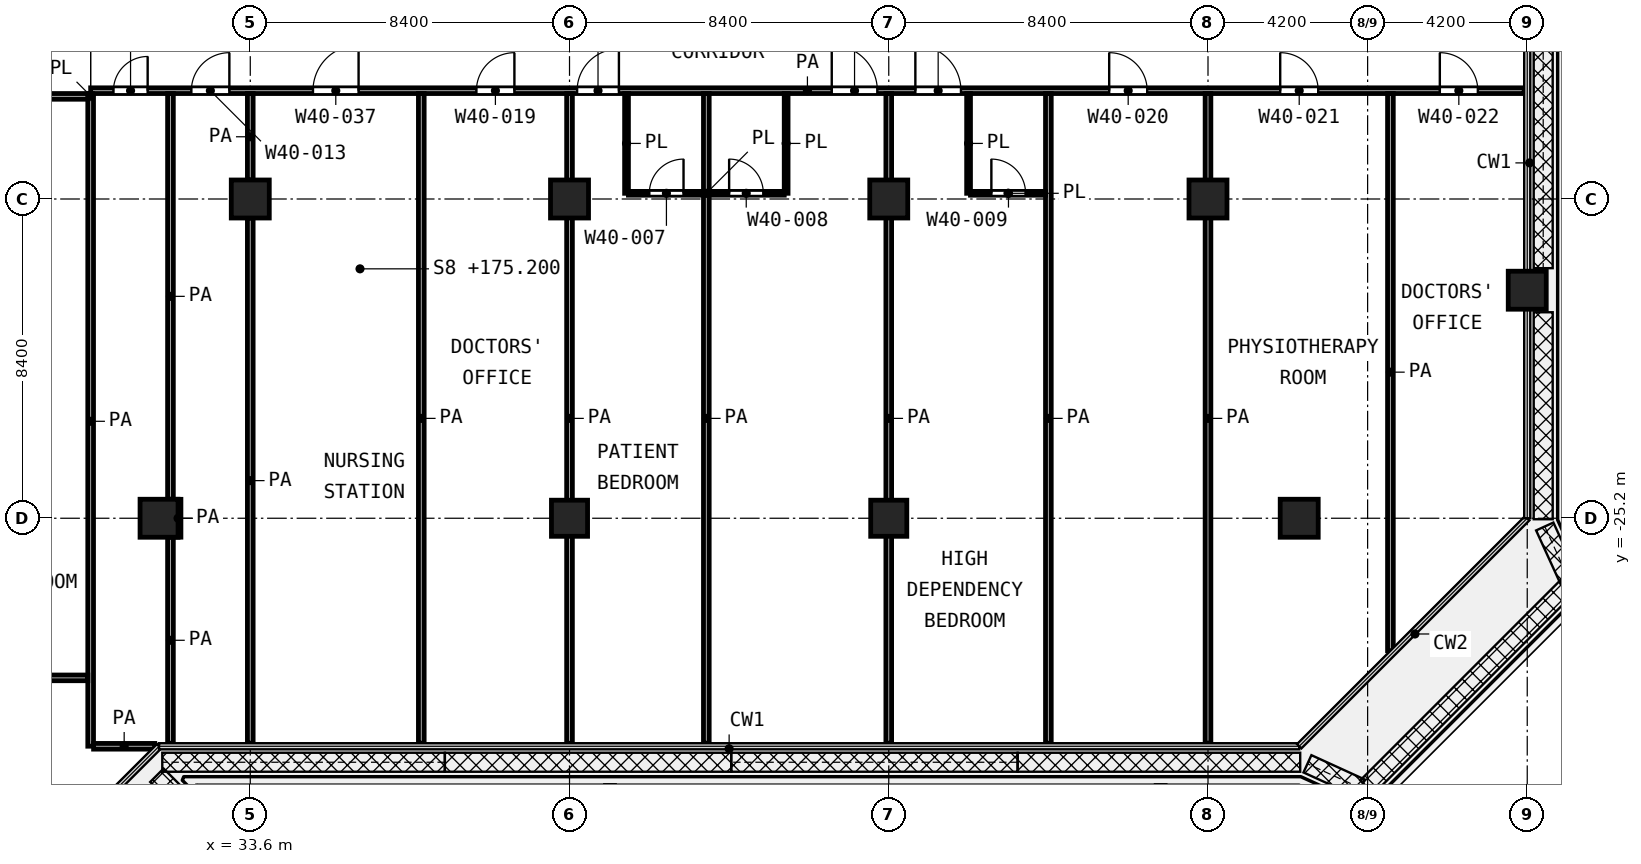
"""IFC4 building model, lengths in metres.
Left out: names, types, materials, properties, quantities, classifications, styles, units other than length and angle.
Written with IfcOpenShell. Run it as: python <this file> out.ifc"""

import sys

from ifc_helpers import new_model, si_unit, direction, frame, frame_2d, origin, origin_2d, place, context, subcontext, project, spatial, rectangle, extrude, element, fill, save


model = new_model("IFC4")
c1 = context("Model", 3, precision=1e-05, world=origin(), true_north=direction((0.0, 1.0)))
c2 = subcontext(c1, "Body", "Model", "MODEL_VIEW")
j1 = project(units=[si_unit("LENGTHUNIT", "METRE"), si_unit("PLANEANGLEUNIT", "RADIAN")], contexts=[c1])
p1 = place(None, origin())
s1 = spatial("IfcSite", under=j1, at=p1, CompositionType="ELEMENT")
p2 = place(p1, origin())
s2 = spatial("IfcBuilding", under=s1, at=p2, CompositionType="ELEMENT")
p3 = place(p2, frame((0.0, 0.0, 175.2)))
s3 = spatial("IfcBuildingStorey", under=s2, at=p3, CompositionType="ELEMENT", Elevation=175.2)
for number, where, z_axis, x_axis in (
    (1, (33.6, -16.8, 0.0), (0.0, 0.0, 1.0), (1.0, 0.0, 0.0)),
    (2, (42.0, -16.8, 0.0), (0.0, 0.0, 1.0), (1.0, 0.0, 0.0)),
    (3, (50.4, -16.8, 0.0), (0.0, 0.0, 1.0), (1.0, 0.0, 0.0)),
    (4, (58.8, -16.8, 0.0), (0.0, 0.0, 1.0), (1.0, 0.0, 0.0)),
    (5, (67.2, -19.2, 0.0), (0.0, 0.0, 1.0), (1.0, 0.0, 0.0)),
    (6, (31.2, -25.2, 0.0), (0.0, 0.0, 1.0), (1.0, 0.0, 0.0)),
):
    element("IfcColumn", number, at=place(p3, frame(where, z_axis=z_axis, x_axis=x_axis)), inside=s3, PredefinedType="COLUMN", context=c2, shape_type="SweptSolid", body=[
        extrude(rectangle(XDim=1.0, YDim=1.0, at=origin_2d()), origin(), (0.0, 0.0, 1.0), 4.2),
    ])
for number, where, z_axis, x_axis in (
    (7, (42.0, -25.2, 0.0), (0.0, 0.0, 1.0), (1.0, 0.0, 0.0)),
    (8, (50.4, -25.2, 0.0), (0.0, 0.0, 1.0), (1.0, 0.0, 0.0)),
):
    element("IfcColumn", number, at=place(p3, frame(where, z_axis=z_axis, x_axis=x_axis)), inside=s3, PredefinedType="COLUMN", context=c2, shape_type="SweptSolid", body=[
        extrude(rectangle(XDim=0.95, YDim=0.95, at=origin_2d()), origin(), (0.0, 0.0, 1.0), 4.2),
    ])
p4 = place(p3, frame((61.2, -25.2, 0.0), z_axis=(0.0, 0.0, 1.0), x_axis=(1.0, 0.0, 0.0)))
e9 = element("IfcColumn", 9, at=p4, inside=s3, PredefinedType="COLUMN", context=c2, shape_type="SweptSolid", body=[
    extrude(rectangle(XDim=1.0, YDim=1.0, at=origin_2d()), origin(), (0.0, 0.0, 1.0), 4.2),
])
p5 = place(p3, frame((43.55, -16.65, 0.0), z_axis=(0.0, 0.0, 1.0), x_axis=(1.0, 0.0, 0.0)))
e10 = element("IfcWall", 10, at=p5, inside=s3, PredefinedType="PARTITIONING", context=c2, shape_type="SweptSolid", body=[
    extrude(rectangle(XDim=4.1, YDim=0.1, at=frame_2d((2.05, 0.0))), origin(), (0.0, 0.0, 1.0), 3.6),
])
p6 = place(p5, frame((0.55, 0.0, 0.0)))
e11 = element("IfcOpeningElement", 11, at=p6, cuts=e10, PredefinedType="OPENING", context=c2, shape_type="SweptSolid", body=[
    extrude(rectangle(XDim=0.9, YDim=2.1, at=frame_2d((0.45, 1.05))), frame((0.0, 0.06, 0.0), z_axis=(0.0, -1.0, 0.0), x_axis=(1.0, 0.0, 0.0)), (0.0, 0.0, 1.0), 0.12),
])
p7 = place(p5, frame((2.65, 0.0, 0.0)))
e12 = element("IfcOpeningElement", 12, at=p7, cuts=e10, PredefinedType="OPENING", context=c2, shape_type="SweptSolid", body=[
    extrude(rectangle(XDim=0.9, YDim=2.1, at=frame_2d((0.45, 1.05))), frame((0.0, 0.06, 0.0), z_axis=(0.0, -1.0, 0.0), x_axis=(1.0, 0.0, 0.0)), (0.0, 0.0, 1.0), 0.12),
])
p8 = place(p3, frame((52.55, -16.65, 0.0), z_axis=(0.0, 0.0, 1.0), x_axis=(1.0, 0.0, 0.0)))
e13 = element("IfcWall", 13, at=p8, inside=s3, PredefinedType="PARTITIONING", context=c2, shape_type="SweptSolid", body=[
    extrude(rectangle(XDim=1.975, YDim=0.1, at=frame_2d((0.987, 0.0))), origin(), (0.0, 0.0, 1.0), 3.6),
])
p9 = place(p8, frame((0.55, 0.0, 0.0)))
e14 = element("IfcOpeningElement", 14, at=p9, cuts=e13, PredefinedType="OPENING", context=c2, shape_type="SweptSolid", body=[
    extrude(rectangle(XDim=0.9, YDim=2.1, at=frame_2d((0.45, 1.05))), frame((0.0, 0.06, 0.0), z_axis=(0.0, -1.0, 0.0), x_axis=(1.0, 0.0, 0.0)), (0.0, 0.0, 1.0), 0.12),
])
p10 = place(p3, frame((29.4, -14.147, 0.0), z_axis=(0.0, 0.0, 1.0), x_axis=(0.0, 1.0, 0.0)))
e15 = element("IfcWall", 15, at=p10, inside=s3, PredefinedType="PARTITIONING", context=c2, shape_type="SweptSolid", body=[
    extrude(rectangle(XDim=0.12, YDim=0.1, at=frame_2d((0.06, 0.0))), origin(), (0.0, 0.0, 1.0), 3.6),
])
for number, where, z_axis, x_axis in (
    (16, (43.5, -16.65, 0.0), (0.0, 0.0, 1.0), (0.0, 1.0, 0.0)),
    (17, (47.7, -16.65, 0.0), (0.0, 0.0, 1.0), (0.0, 1.0, 0.0)),
    (18, (52.5, -16.65, 0.0), (0.0, 0.0, 1.0), (0.0, 1.0, 0.0)),
):
    element("IfcWall", number, at=place(p3, frame(where, z_axis=z_axis, x_axis=x_axis)), inside=s3, PredefinedType="PARTITIONING", context=c2, shape_type="SweptSolid", body=[
        extrude(rectangle(XDim=2.625, YDim=0.1, at=frame_2d((1.312, 0.0))), origin(), (0.0, 0.0, 1.0), 3.6),
    ])
p11 = place(p3, frame((29.477, -31.2, 0.0), z_axis=(0.0, 0.0, 1.0), x_axis=(1.0, 0.0, 0.0)))
e19 = element("IfcWall", 19, at=p11, inside=s3, PredefinedType="PARTITIONING", context=c2, shape_type="SweptSolid", body=[
    extrude(rectangle(XDim=1.61, YDim=0.15, at=frame_2d((0.805, 0.0))), origin(), (0.0, 0.0, 1.0), 3.6),
])
p12 = place(p3, frame((14.175, -29.4, 0.0), z_axis=(0.0, 0.0, 1.0), x_axis=(1.0, 0.0, 0.0)))
e20 = element("IfcWall", 20, at=p12, inside=s3, PredefinedType="PARTITIONING", context=c2, shape_type="SweptSolid", body=[
    extrude(rectangle(XDim=15.15, YDim=0.15, at=frame_2d((7.575, 0.0))), origin(), (0.0, 0.0, 1.0), 3.6),
])
p13 = place(p3, frame((24.9, -14.1, 0.0), z_axis=(0.0, 0.0, 1.0), x_axis=(1.0, 0.0, 0.0)))
e21 = element("IfcWall", 21, at=p13, inside=s3, PredefinedType="PARTITIONING", context=c2, shape_type="SweptSolid", body=[
    extrude(rectangle(XDim=4.425, YDim=0.15, at=frame_2d((2.212, 0.0))), origin(), (0.0, 0.0, 1.0), 3.6),
])
p14 = place(p13, frame((1.65, 0.0, 0.0)))
e22 = element("IfcOpeningElement", 22, at=p14, cuts=e21, PredefinedType="OPENING", context=c2, shape_type="SweptSolid", body=[
    extrude(rectangle(XDim=1.5, YDim=2.1, at=frame_2d((0.75, 1.05))), frame((0.0, 0.085, 0.0), z_axis=(0.0, -1.0, 0.0), x_axis=(1.0, 0.0, 0.0)), (0.0, 0.0, 1.0), 0.17),
])
p15 = place(p3, frame((29.4, -13.95, 0.0), z_axis=(0.0, 0.0, 1.0), x_axis=(1.0, 0.0, 0.0)))
e23 = element("IfcWall", 23, at=p15, inside=s3, PredefinedType="PARTITIONING", context=c2, shape_type="SweptSolid", body=[
    extrude(rectangle(XDim=37.72, YDim=0.15, at=frame_2d((18.86, 0.0))), origin(), (0.0, 0.0, 1.0), 3.6),
])
p16 = place(p15, frame((10.15, 0.0, 0.0)))
e24 = element("IfcOpeningElement", 24, at=p16, cuts=e23, PredefinedType="OPENING", context=c2, shape_type="SweptSolid", body=[
    extrude(rectangle(XDim=1.0, YDim=2.1, at=frame_2d((0.5, 1.05))), frame((0.0, 0.085, 0.0), z_axis=(0.0, -1.0, 0.0), x_axis=(1.0, 0.0, 0.0)), (0.0, 0.0, 1.0), 0.17),
])
p17 = place(p15, frame((12.8, 0.0, 0.0)))
e25 = element("IfcOpeningElement", 25, at=p17, cuts=e23, PredefinedType="OPENING", context=c2, shape_type="SweptSolid", body=[
    extrude(rectangle(XDim=1.1, YDim=2.1, at=frame_2d((0.55, 1.05))), frame((0.0, 0.085, 0.0), z_axis=(0.0, -1.0, 0.0), x_axis=(1.0, 0.0, 0.0)), (0.0, 0.0, 1.0), 0.17),
])
p18 = place(p15, frame((19.5, 0.0, 0.0)))
e26 = element("IfcOpeningElement", 26, at=p18, cuts=e23, PredefinedType="OPENING", context=c2, shape_type="SweptSolid", body=[
    extrude(rectangle(XDim=1.2, YDim=2.1, at=frame_2d((0.6, 1.05))), frame((0.0, 0.085, 0.0), z_axis=(0.0, -1.0, 0.0), x_axis=(1.0, 0.0, 0.0)), (0.0, 0.0, 1.0), 0.17),
])
p19 = place(p15, frame((21.7, 0.0, 0.0)))
e27 = element("IfcOpeningElement", 27, at=p19, cuts=e23, PredefinedType="OPENING", context=c2, shape_type="SweptSolid", body=[
    extrude(rectangle(XDim=1.2, YDim=2.1, at=frame_2d((0.6, 1.05))), frame((0.0, 0.085, 0.0), z_axis=(0.0, -1.0, 0.0), x_axis=(1.0, 0.0, 0.0)), (0.0, 0.0, 1.0), 0.17),
])
p20 = place(p15, frame((26.8, 0.0, 0.0)))
e28 = element("IfcOpeningElement", 28, at=p20, cuts=e23, PredefinedType="OPENING", context=c2, shape_type="SweptSolid", body=[
    extrude(rectangle(XDim=1.0, YDim=2.1, at=frame_2d((0.5, 1.05))), frame((0.0, 0.085, 0.0), z_axis=(0.0, -1.0, 0.0), x_axis=(1.0, 0.0, 0.0)), (0.0, 0.0, 1.0), 0.17),
])
p21 = place(p15, frame((31.3, 0.0, 0.0)))
e29 = element("IfcOpeningElement", 29, at=p21, cuts=e23, PredefinedType="OPENING", context=c2, shape_type="SweptSolid", body=[
    extrude(rectangle(XDim=1.0, YDim=2.1, at=frame_2d((0.5, 1.05))), frame((0.0, 0.085, 0.0), z_axis=(0.0, -1.0, 0.0), x_axis=(1.0, 0.0, 0.0)), (0.0, 0.0, 1.0), 0.17),
])
p22 = place(p15, frame((35.5, 0.0, 0.0)))
e30 = element("IfcOpeningElement", 30, at=p22, cuts=e23, PredefinedType="OPENING", context=c2, shape_type="SweptSolid", body=[
    extrude(rectangle(XDim=1.0, YDim=2.1, at=frame_2d((0.5, 1.05))), frame((0.0, 0.085, 0.0), z_axis=(0.0, -1.0, 0.0), x_axis=(1.0, 0.0, 0.0)), (0.0, 0.0, 1.0), 0.17),
])
p23 = place(p15, frame((0.6, 0.0, 0.0)))
e31 = element("IfcOpeningElement", 31, at=p23, cuts=e23, PredefinedType="OPENING", context=c2, shape_type="SweptSolid", body=[
    extrude(rectangle(XDim=0.9, YDim=2.1, at=frame_2d((0.45, 1.05))), frame((0.0, 0.085, 0.0), z_axis=(0.0, -1.0, 0.0), x_axis=(1.0, 0.0, 0.0)), (0.0, 0.0, 1.0), 0.17),
])
p24 = place(p15, frame((2.65, 0.0, 0.0)))
e32 = element("IfcOpeningElement", 32, at=p24, cuts=e23, PredefinedType="OPENING", context=c2, shape_type="SweptSolid", body=[
    extrude(rectangle(XDim=1.0, YDim=2.1, at=frame_2d((0.5, 1.05))), frame((0.0, 0.085, 0.0), z_axis=(0.0, -1.0, 0.0), x_axis=(1.0, 0.0, 0.0)), (0.0, 0.0, 1.0), 0.17),
])
p25 = place(p15, frame((5.85, 0.0, 0.0)))
e33 = element("IfcOpeningElement", 33, at=p25, cuts=e23, PredefinedType="OPENING", context=c2, shape_type="SweptSolid", body=[
    extrude(rectangle(XDim=1.2, YDim=2.1, at=frame_2d((0.6, 1.05))), frame((0.0, 0.085, 0.0), z_axis=(0.0, -1.0, 0.0), x_axis=(1.0, 0.0, 0.0)), (0.0, 0.0, 1.0), 0.17),
])
p26 = place(p3, frame((29.4, -31.198, 0.0), z_axis=(0.0, 0.0, 1.0), x_axis=(0.0, 1.0, 0.0)))
e34 = element("IfcWall", 34, at=p26, inside=s3, PredefinedType="PARTITIONING", context=c2, shape_type="SweptSolid", body=[
    extrude(rectangle(XDim=17.098, YDim=0.15, at=frame_2d((8.549, 0.0))), origin(), (0.0, 0.0, 1.0), 3.6),
])
p27 = place(p3, frame((31.5, -31.12, 0.0), z_axis=(0.0, 0.0, 1.0), x_axis=(0.0, 1.0, 0.0)))
e35 = element("IfcWall", 35, at=p27, inside=s3, PredefinedType="PARTITIONING", context=c2, shape_type="SweptSolid", body=[
    extrude(rectangle(XDim=5.418, YDim=0.15, at=frame_2d((2.709, 0.0))), origin(), (0.0, 0.0, 1.0), 3.6),
])
p28 = place(p3, frame((31.5, -24.698, 0.0), z_axis=(0.0, 0.0, 1.0), x_axis=(0.0, 1.0, 0.0)))
e36 = element("IfcWall", 36, at=p28, inside=s3, PredefinedType="PARTITIONING", context=c2, shape_type="SweptSolid", body=[
    extrude(rectangle(XDim=10.673, YDim=0.15, at=frame_2d((5.336, 0.0))), origin(), (0.0, 0.0, 1.0), 3.6),
])
p29 = place(p3, frame((31.7, -25.698, 0.0), z_axis=(0.0, 0.0, 1.0), x_axis=(0.0, 1.0, 0.0)))
e37 = element("IfcWall", 37, at=p29, inside=s3, PredefinedType="PARTITIONING", context=c2, shape_type="SweptSolid", body=[
    extrude(rectangle(XDim=0.996, YDim=0.15, at=frame_2d((0.498, 0.0))), origin(), (0.0, 0.0, 1.0), 3.6),
])
p30 = place(p3, frame((33.6, -31.12, 0.0), z_axis=(0.0, 0.0, 1.0), x_axis=(0.0, 1.0, 0.0)))
e38 = element("IfcWall", 38, at=p30, inside=s3, PredefinedType="PARTITIONING", context=c2, shape_type="SweptSolid", body=[
    extrude(rectangle(XDim=13.82, YDim=0.15, at=frame_2d((6.91, 0.0))), origin(), (0.0, 0.0, 1.0), 3.6),
])
p31 = place(p3, frame((33.6, -16.3, 0.0), z_axis=(0.0, 0.0, 1.0), x_axis=(0.0, 1.0, 0.0)))
e39 = element("IfcWall", 39, at=p31, inside=s3, PredefinedType="PARTITIONING", context=c2, shape_type="SweptSolid", body=[
    extrude(rectangle(XDim=2.275, YDim=0.15, at=frame_2d((1.138, 0.0))), origin(), (0.0, 0.0, 1.0), 3.6),
])
for number, where, z_axis, x_axis in (
    (40, (38.1, -31.12, 0.0), (0.0, 0.0, 1.0), (0.0, 1.0, 0.0)),
    (41, (42.0, -31.12, 0.0), (0.0, 0.0, 1.0), (0.0, 1.0, 0.0)),
    (42, (45.6, -31.12, 0.0), (0.0, 0.0, 1.0), (0.0, 1.0, 0.0)),
    (43, (50.4, -31.12, 0.0), (0.0, 0.0, 1.0), (0.0, 1.0, 0.0)),
    (44, (54.6, -31.12, 0.0), (0.0, 0.0, 1.0), (0.0, 1.0, 0.0)),
    (45, (58.8, -31.12, 0.0), (0.0, 0.0, 1.0), (0.0, 1.0, 0.0)),
):
    element("IfcWall", number, at=place(p3, frame(where, z_axis=z_axis, x_axis=x_axis)), inside=s3, PredefinedType="PARTITIONING", context=c2, shape_type="SweptSolid", body=[
        extrude(rectangle(XDim=17.095, YDim=0.15, at=frame_2d((8.548, 0.0))), origin(), (0.0, 0.0, 1.0), 3.6),
    ])
p32 = place(p3, frame((63.6, -28.687, 0.0), z_axis=(0.0, 0.0, 1.0), x_axis=(0.0, 1.0, 0.0)))
e46 = element("IfcWall", 46, at=p32, inside=s3, PredefinedType="PARTITIONING", context=c2, shape_type="SweptSolid", body=[
    extrude(rectangle(XDim=14.662, YDim=0.15, at=frame_2d((7.331, 0.0))), origin(), (0.0, 0.0, 1.0), 3.6),
])
p33 = place(p16, origin())
e47 = element("IfcDoor", 47, at=p33, inside=s3, OperationType="SINGLE_SWING_RIGHT", PredefinedType="DOOR", context=c2, shape_type="SweptSolid", body=[
    extrude(rectangle(XDim=1.0, YDim=2.1, at=frame_2d((0.5, 1.05))), frame((0.0, 0.025, 0.0), z_axis=(0.0, -1.0, 0.0), x_axis=(1.0, 0.0, 0.0)), (0.0, 0.0, 1.0), 0.05),
])
fill(e24, e47)
p34 = place(p17, origin())
e48 = element("IfcDoor", 48, at=p34, inside=s3, OperationType="SINGLE_SWING_RIGHT", PredefinedType="DOOR", context=c2, shape_type="SweptSolid", body=[
    extrude(rectangle(XDim=1.1, YDim=2.1, at=frame_2d((0.55, 1.05))), frame((0.0, 0.025, 0.0), z_axis=(0.0, -1.0, 0.0), x_axis=(1.0, 0.0, 0.0)), (0.0, 0.0, 1.0), 0.05),
])
fill(e25, e48)
p35 = place(p6, origin())
e49 = element("IfcDoor", 49, at=p35, inside=s3, OperationType="SINGLE_SWING_RIGHT", PredefinedType="DOOR", context=c2, shape_type="SweptSolid", body=[
    extrude(rectangle(XDim=0.9, YDim=2.1, at=frame_2d((0.45, 1.05))), frame((0.0, 0.025, 0.0), z_axis=(0.0, -1.0, 0.0), x_axis=(1.0, 0.0, 0.0)), (0.0, 0.0, 1.0), 0.05),
])
fill(e11, e49)
p36 = place(p18, origin())
e50 = element("IfcDoor", 50, at=p36, inside=s3, OperationType="SINGLE_SWING_LEFT", PredefinedType="DOOR", context=c2, shape_type="SweptSolid", body=[
    extrude(rectangle(XDim=1.2, YDim=2.1, at=frame_2d((0.6, 1.05))), frame((0.0, 0.025, 0.0), z_axis=(0.0, -1.0, 0.0), x_axis=(1.0, 0.0, 0.0)), (0.0, 0.0, 1.0), 0.05),
])
fill(e26, e50)
p37 = place(p7, origin())
e51 = element("IfcDoor", 51, at=p37, inside=s3, OperationType="SINGLE_SWING_LEFT", PredefinedType="DOOR", context=c2, shape_type="SweptSolid", body=[
    extrude(rectangle(XDim=0.9, YDim=2.1, at=frame_2d((0.45, 1.05))), frame((0.0, 0.025, 0.0), z_axis=(0.0, -1.0, 0.0), x_axis=(1.0, 0.0, 0.0)), (0.0, 0.0, 1.0), 0.05),
])
fill(e12, e51)
p38 = place(p19, origin())
e52 = element("IfcDoor", 52, at=p38, inside=s3, OperationType="SINGLE_SWING_LEFT", PredefinedType="DOOR", context=c2, shape_type="SweptSolid", body=[
    extrude(rectangle(XDim=1.2, YDim=2.1, at=frame_2d((0.6, 1.05))), frame((0.0, 0.025, 0.0), z_axis=(0.0, -1.0, 0.0), x_axis=(1.0, 0.0, 0.0)), (0.0, 0.0, 1.0), 0.05),
])
fill(e27, e52)
p39 = place(p9, origin())
e53 = element("IfcDoor", 53, at=p39, inside=s3, OperationType="SINGLE_SWING_LEFT", PredefinedType="DOOR", context=c2, shape_type="SweptSolid", body=[
    extrude(rectangle(XDim=0.9, YDim=2.1, at=frame_2d((0.45, 1.05))), frame((0.0, 0.025, 0.0), z_axis=(0.0, -1.0, 0.0), x_axis=(1.0, 0.0, 0.0)), (0.0, 0.0, 1.0), 0.05),
])
fill(e14, e53)
p40 = place(p20, origin())
e54 = element("IfcDoor", 54, at=p40, inside=s3, OperationType="SINGLE_SWING_LEFT", PredefinedType="DOOR", context=c2, shape_type="SweptSolid", body=[
    extrude(rectangle(XDim=1.0, YDim=2.1, at=frame_2d((0.5, 1.05))), frame((0.0, 0.025, 0.0), z_axis=(0.0, -1.0, 0.0), x_axis=(1.0, 0.0, 0.0)), (0.0, 0.0, 1.0), 0.05),
])
fill(e28, e54)
p41 = place(p21, origin())
e55 = element("IfcDoor", 55, at=p41, inside=s3, OperationType="SINGLE_SWING_LEFT", PredefinedType="DOOR", context=c2, shape_type="SweptSolid", body=[
    extrude(rectangle(XDim=1.0, YDim=2.1, at=frame_2d((0.5, 1.05))), frame((0.0, 0.025, 0.0), z_axis=(0.0, -1.0, 0.0), x_axis=(1.0, 0.0, 0.0)), (0.0, 0.0, 1.0), 0.05),
])
fill(e29, e55)
p42 = place(p22, origin())
e56 = element("IfcDoor", 56, at=p42, inside=s3, OperationType="SINGLE_SWING_LEFT", PredefinedType="DOOR", context=c2, shape_type="SweptSolid", body=[
    extrude(rectangle(XDim=1.0, YDim=2.1, at=frame_2d((0.5, 1.05))), frame((0.0, 0.025, 0.0), z_axis=(0.0, -1.0, 0.0), x_axis=(1.0, 0.0, 0.0)), (0.0, 0.0, 1.0), 0.05),
])
fill(e30, e56)
p43 = place(p23, origin())
e57 = element("IfcDoor", 57, at=p43, inside=s3, OperationType="SINGLE_SWING_RIGHT", PredefinedType="DOOR", context=c2, shape_type="SweptSolid", body=[
    extrude(rectangle(XDim=0.9, YDim=2.1, at=frame_2d((0.45, 1.05))), frame((0.0, 0.025, 0.0), z_axis=(0.0, -1.0, 0.0), x_axis=(1.0, 0.0, 0.0)), (0.0, 0.0, 1.0), 0.05),
])
fill(e31, e57)
p44 = place(p24, origin())
e58 = element("IfcDoor", 58, at=p44, inside=s3, OperationType="SINGLE_SWING_RIGHT", PredefinedType="DOOR", context=c2, shape_type="SweptSolid", body=[
    extrude(rectangle(XDim=1.0, YDim=2.1, at=frame_2d((0.5, 1.05))), frame((0.0, 0.025, 0.0), z_axis=(0.0, -1.0, 0.0), x_axis=(1.0, 0.0, 0.0)), (0.0, 0.0, 1.0), 0.05),
])
fill(e32, e58)
p45 = place(p25, origin())
e59 = element("IfcDoor", 59, at=p45, inside=s3, OperationType="SINGLE_SWING_RIGHT", PredefinedType="DOOR", context=c2, shape_type="SweptSolid", body=[
    extrude(rectangle(XDim=1.2, YDim=2.1, at=frame_2d((0.6, 1.05))), frame((0.0, 0.025, 0.0), z_axis=(0.0, -1.0, 0.0), x_axis=(1.0, 0.0, 0.0)), (0.0, 0.0, 1.0), 0.05),
])
fill(e33, e59)
save(model, sys.argv[1])
